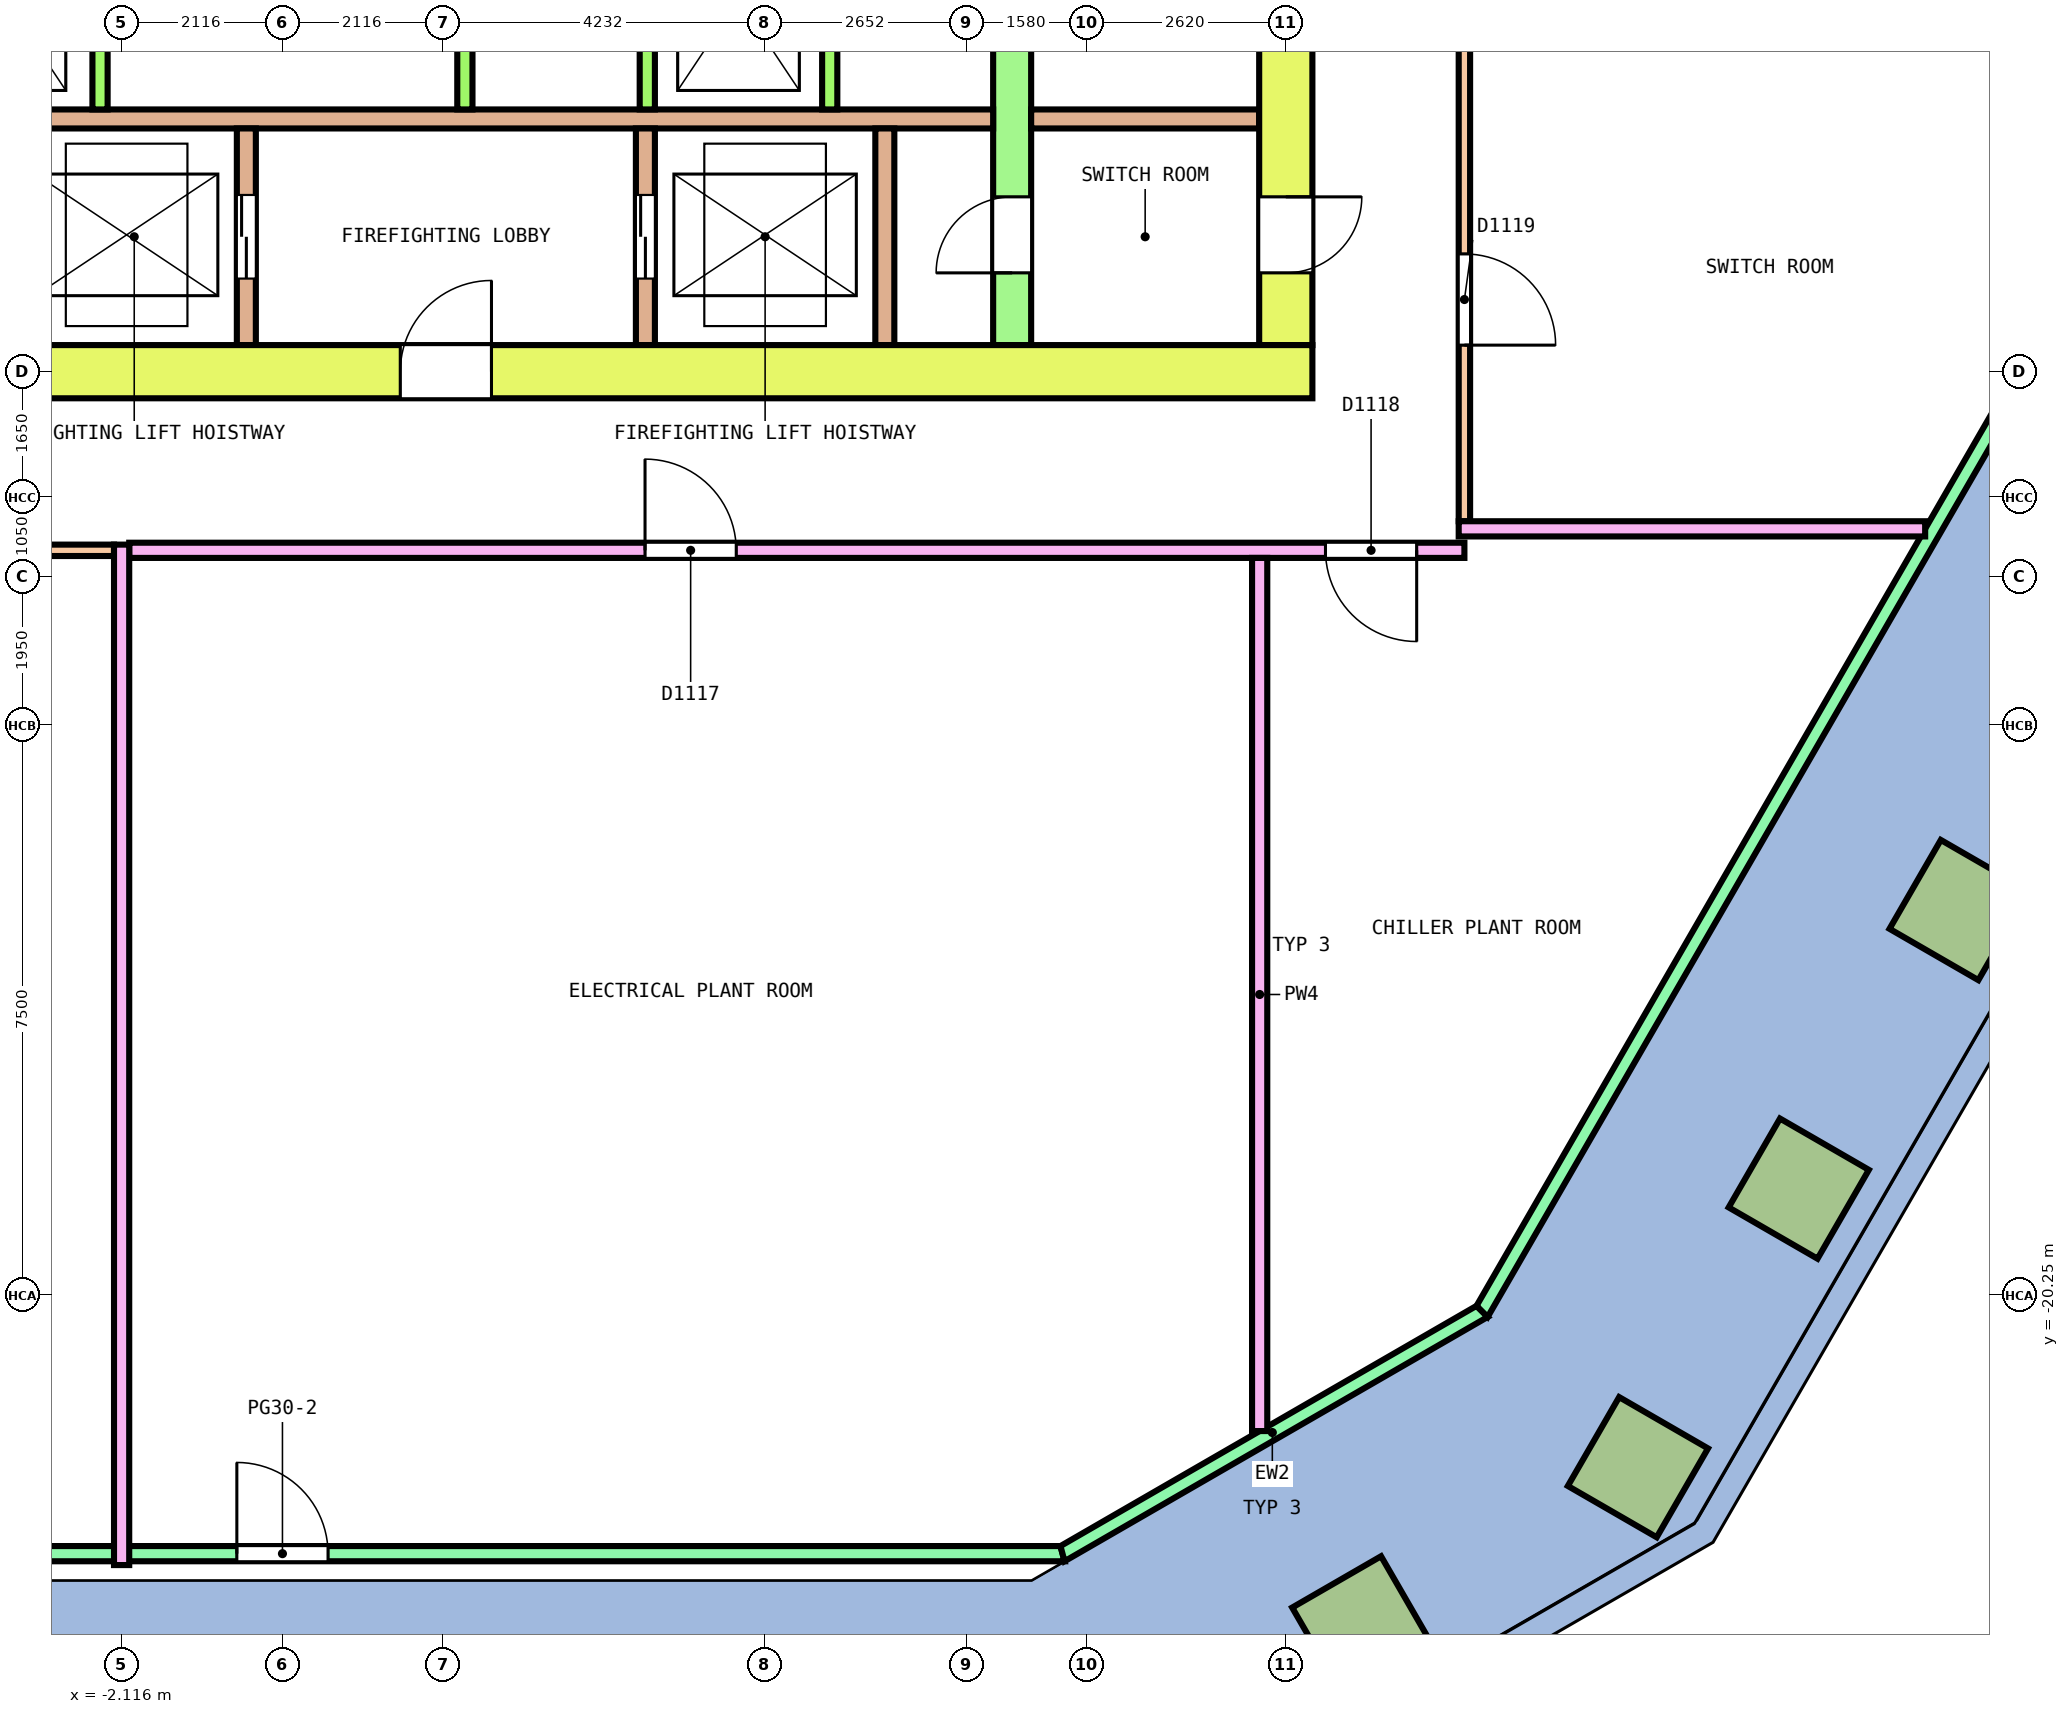
"""IFC4 building model, lengths in metres.
Left out: names, types, materials, properties, quantities, classifications, styles, units other than length and angle.
Written with IfcOpenShell. Run it as: python <this file> out.ifc"""

import sys

from ifc_helpers import new_model, si_unit, direction, frame, frame_2d, origin, origin_2d, place, context, subcontext, project, spatial, polyline, rectangle, outline, extrude, element, fill, save


model = new_model("IFC4")
c1 = context("Model", 3, precision=1e-05, world=origin(), true_north=direction((0.0, 1.0)))
c2 = subcontext(c1, "Body", "Model", "MODEL_VIEW")
j1 = project(units=[si_unit("LENGTHUNIT", "METRE"), si_unit("PLANEANGLEUNIT", "RADIAN")], contexts=[c1])
p1 = place(None, origin())
s1 = spatial("IfcSite", under=j1, at=p1, CompositionType="ELEMENT")
p2 = place(p1, origin())
s2 = spatial("IfcBuilding", under=s1, at=p2, CompositionType="ELEMENT")
p3 = place(p2, frame((0.0, 0.0, 139.6)))
s3 = spatial("IfcBuildingStorey", under=s2, at=p3, CompositionType="ELEMENT", Elevation=139.6)
for number, where, z_axis, x_axis in (
    (1, (14.206, -24.606, 0.0), (0.0, 0.0, 1.0), (0.866, 0.5, 0.0)),
    (2, (17.833, -22.512, 0.0), (0.0, 0.0, 1.0), (0.5, 0.866, 0.0)),
    (3, (19.949, -18.847, 0.0), (0.0, 0.0, 1.0), (0.5, 0.866, 0.0)),
    (4, (22.065, -15.183, 0.0), (0.0, 0.0, 1.0), (0.5, 0.866, 0.0)),
):
    element("IfcColumn", number, at=place(p3, frame(where, z_axis=z_axis, x_axis=x_axis)), inside=s3, PredefinedType="COLUMN", context=c2, shape_type="SweptSolid", body=[
        extrude(rectangle(XDim=1.35, YDim=1.35, at=origin_2d()), origin(), (0.0, 0.0, 1.0), 5.25),
    ])
p4 = place(p3, frame((-10.263, -23.65, 0.0), z_axis=(0.0, 0.0, 1.0), x_axis=(1.0, 0.0, 0.0)))
e5 = element("IfcWall", 5, at=p4, inside=s3, PredefinedType="SOLIDWALL", context=c2, shape_type="SweptSolid", body=[
    extrude(outline(polyline([(-0.027, -0.1), (20.552, -0.1), (20.499, 0.1), (0.027, 0.1), (-0.027, -0.1)])), origin(), (0.0, 0.0, 1.0), 4.55),
])
p5 = place(p4, frame((9.663, 0.0, 0.0)))
e6 = element("IfcOpeningElement", 6, at=p5, cuts=e5, PredefinedType="OPENING", context=c2, shape_type="SweptSolid", body=[
    extrude(rectangle(XDim=1.2, YDim=2.1, at=frame_2d((0.6, 1.05))), frame((0.0, 0.11, 0.0), z_axis=(0.0, -1.0, 0.0), x_axis=(1.0, 0.0, 0.0)), (0.0, 0.0, 1.0), 0.22),
])
p6 = place(p3, frame((10.263, -23.65, 0.0), z_axis=(0.0, 0.0, 1.0), x_axis=(0.866026138243, 0.499998727878, 0.0)))
e7 = element("IfcWall", 7, at=p6, inside=s3, PredefinedType="SOLIDWALL", context=c2, shape_type="SweptSolid", body=[
    extrude(outline(polyline([(-0.027, -0.1), (6.401, -0.1), (6.348, 0.1), (0.027, 0.1), (-0.027, -0.1)])), origin(), (0.0, 0.0, 1.0), 4.55),
])
p7 = place(p3, frame((15.783, -20.463, 0.0), z_axis=(0.0, 0.0, 1.0), x_axis=(0.499999083763, 0.866025932773, 0.0)))
e8 = element("IfcWall", 8, at=p7, inside=s3, PredefinedType="SOLIDWALL", context=c2, shape_type="SweptSolid", body=[
    extrude(outline(polyline([(-0.027, -0.1), (19.686, -0.1), (19.632, 0.1), (0.027, 0.1), (-0.027, -0.1)])), origin(), (0.0, 0.0, 1.0), 4.55),
])
p8 = place(p3, frame((-13.55, -8.1, 0.0), z_axis=(0.0, 0.0, 1.0), x_axis=(1.0, 0.0, 0.0)))
e9 = element("IfcWall", 9, at=p8, inside=s3, PredefinedType="SHEAR", context=c2, shape_type="SweptSolid", body=[
    extrude(rectangle(XDim=27.1, YDim=0.7, at=frame_2d((13.55, 0.0))), origin(), (0.0, 0.0, 1.0), 5.3),
])
p9 = place(p8, frame((15.1, 0.0, 0.0)))
e10 = element("IfcOpeningElement", 10, at=p9, cuts=e9, PredefinedType="OPENING", context=c2, shape_type="SweptSolid", body=[
    extrude(rectangle(XDim=1.2, YDim=2.1, at=frame_2d((0.6, 1.05))), frame((0.0, 0.36, 0.0), z_axis=(0.0, -1.0, 0.0), x_axis=(1.0, 0.0, 0.0)), (0.0, 0.0, 1.0), 0.72),
])
p10 = place(p3, frame((13.2, -7.75, 0.0), z_axis=(0.0, 0.0, 1.0), x_axis=(0.0, 1.0, 0.0)))
e11 = element("IfcWall", 11, at=p10, inside=s3, PredefinedType="SHEAR", context=c2, shape_type="SweptSolid", body=[
    extrude(rectangle(XDim=15.5, YDim=0.7, at=frame_2d((7.75, 0.0))), origin(), (0.0, 0.0, 1.0), 5.3),
])
p11 = place(p10, frame((6.55, 0.0, 0.0)))
e12 = element("IfcOpeningElement", 12, at=p11, cuts=e11, PredefinedType="OPENING", context=c2, shape_type="SweptSolid", body=[
    extrude(rectangle(XDim=2.4, YDim=2.1, at=frame_2d((1.2, 1.05))), frame((0.0, 0.36, 0.0), z_axis=(0.0, -1.0, 0.0), x_axis=(1.0, 0.0, 0.0)), (0.0, 0.0, 1.0), 0.72),
])
p12 = place(p10, frame((13.45, 0.0, 0.0)))
e13 = element("IfcOpeningElement", 13, at=p12, cuts=e11, PredefinedType="OPENING", context=c2, shape_type="SweptSolid", body=[
    extrude(rectangle(XDim=1.2, YDim=2.1, at=frame_2d((0.6, 1.05))), frame((0.0, 0.36, 0.0), z_axis=(0.0, -1.0, 0.0), x_axis=(1.0, 0.0, 0.0)), (0.0, 0.0, 1.0), 0.72),
])
p13 = place(p10, frame((0.95, 0.0, 0.0)))
e14 = element("IfcOpeningElement", 14, at=p13, cuts=e11, PredefinedType="OPENING", context=c2, shape_type="SweptSolid", body=[
    extrude(rectangle(XDim=1.0, YDim=2.1, at=frame_2d((0.5, 1.05))), frame((0.0, 0.36, 0.0), z_axis=(0.0, -1.0, 0.0), x_axis=(1.0, 0.0, 0.0)), (0.0, 0.0, 1.0), 0.72),
])
p14 = place(p3, frame((9.6, -7.75, 0.0), z_axis=(0.0, 0.0, 1.0), x_axis=(0.0, 1.0, 0.0)))
e15 = element("IfcWall", 15, at=p14, inside=s3, PredefinedType="SHEAR", context=c2, shape_type="SweptSolid", body=[
    extrude(rectangle(XDim=15.5, YDim=0.5, at=frame_2d((7.75, 0.0))), origin(), (0.0, 0.0, 1.0), 5.3),
])
p15 = place(p14, frame((6.55, 0.0, 0.0)))
e16 = element("IfcOpeningElement", 16, at=p15, cuts=e15, PredefinedType="OPENING", context=c2, shape_type="SweptSolid", body=[
    extrude(rectangle(XDim=2.4, YDim=2.1, at=frame_2d((1.2, 1.05))), frame((0.0, 0.26, 0.0), z_axis=(0.0, -1.0, 0.0), x_axis=(1.0, 0.0, 0.0)), (0.0, 0.0, 1.0), 0.52),
])
p16 = place(p14, frame((13.45, 0.0, 0.0)))
e17 = element("IfcOpeningElement", 17, at=p16, cuts=e15, PredefinedType="OPENING", context=c2, shape_type="SweptSolid", body=[
    extrude(rectangle(XDim=1.2, YDim=2.1, at=frame_2d((0.6, 1.05))), frame((0.0, 0.26, 0.0), z_axis=(0.0, -1.0, 0.0), x_axis=(1.0, 0.0, 0.0)), (0.0, 0.0, 1.0), 0.52),
])
p17 = place(p14, frame((0.95, 0.0, 0.0)))
e18 = element("IfcOpeningElement", 18, at=p17, cuts=e15, PredefinedType="OPENING", context=c2, shape_type="SweptSolid", body=[
    extrude(rectangle(XDim=1.0, YDim=2.1, at=frame_2d((0.5, 1.05))), frame((0.0, 0.26, 0.0), z_axis=(0.0, -1.0, 0.0), x_axis=(1.0, 0.0, 0.0)), (0.0, 0.0, 1.0), 0.52),
])
p18 = place(p3, frame((-9.35, -4.775, 0.0), z_axis=(0.0, 0.0, 1.0), x_axis=(1.0, 0.0, 0.0)))
e19 = element("IfcWall", 19, at=p18, inside=s3, PredefinedType="SOLIDWALL", context=c2, shape_type="SweptSolid", body=[
    extrude(rectangle(XDim=18.7, YDim=0.25, at=frame_2d((9.35, 0.0))), origin(), (0.0, 0.0, 1.0), 5.3),
])
p19 = place(p3, frame((9.85, -4.775, 0.0), z_axis=(0.0, 0.0, 1.0), x_axis=(1.0, 0.0, 0.0)))
e20 = element("IfcWall", 20, at=p19, inside=s3, PredefinedType="SOLIDWALL", context=c2, shape_type="SweptSolid", body=[
    extrude(rectangle(XDim=3.0, YDim=0.25, at=frame_2d((1.5, 0.0))), origin(), (0.0, 0.0, 1.0), 5.3),
])
for number, where, z_axis, x_axis in (
    (21, (-2.4, -4.65, 0.0), (0.0, 0.0, 1.0), (0.0, 1.0, 0.0)),
    (22, (2.4, -4.65, 0.0), (0.0, 0.0, 1.0), (0.0, 1.0, 0.0)),
    (23, (4.8, -4.65, 0.0), (0.0, 0.0, 1.0), (0.0, 1.0, 0.0)),
    (24, (7.2, -4.65, 0.0), (0.0, 0.0, 1.0), (0.0, 1.0, 0.0)),
):
    element("IfcWall", number, at=place(p3, frame(where, z_axis=z_axis, x_axis=x_axis)), inside=s3, PredefinedType="SOLIDWALL", context=c2, shape_type="SweptSolid", body=[
        extrude(rectangle(XDim=2.9, YDim=0.2, at=frame_2d((1.45, 0.0))), origin(), (0.0, 0.0, 1.0), 5.3),
    ])
p20 = place(p3, frame((-0.475, -7.75, 0.0), z_axis=(0.0, 0.0, 1.0), x_axis=(0.0, 1.0, 0.0)))
e25 = element("IfcWall", 25, at=p20, inside=s3, PredefinedType="SOLIDWALL", context=c2, shape_type="SweptSolid", body=[
    extrude(rectangle(XDim=2.85, YDim=0.25, at=frame_2d((1.425, 0.0))), origin(), (0.0, 0.0, 1.0), 5.3),
])
p21 = place(p20, frame((0.875, 0.0, 0.0)))
e26 = element("IfcOpeningElement", 26, at=p21, cuts=e25, PredefinedType="OPENING", context=c2, shape_type="SweptSolid", body=[
    extrude(rectangle(XDim=1.1, YDim=2.1, at=frame_2d((0.55, 1.05))), frame((0.0, 0.135, 0.0), z_axis=(0.0, -1.0, 0.0), x_axis=(1.0, 0.0, 0.0)), (0.0, 0.0, 1.0), 0.27),
])
p22 = place(p3, frame((4.775, -7.75, 0.0), z_axis=(0.0, 0.0, 1.0), x_axis=(0.0, 1.0, 0.0)))
e27 = element("IfcWall", 27, at=p22, inside=s3, PredefinedType="SOLIDWALL", context=c2, shape_type="SweptSolid", body=[
    extrude(rectangle(XDim=2.85, YDim=0.25, at=frame_2d((1.425, 0.0))), origin(), (0.0, 0.0, 1.0), 5.3),
])
p23 = place(p22, frame((0.875, 0.0, 0.0)))
e28 = element("IfcOpeningElement", 28, at=p23, cuts=e27, PredefinedType="OPENING", context=c2, shape_type="SweptSolid", body=[
    extrude(rectangle(XDim=1.1, YDim=2.1, at=frame_2d((0.55, 1.05))), frame((0.0, 0.135, 0.0), z_axis=(0.0, -1.0, 0.0), x_axis=(1.0, 0.0, 0.0)), (0.0, 0.0, 1.0), 0.27),
])
p24 = place(p3, frame((7.925, -7.75, 0.0), z_axis=(0.0, 0.0, 1.0), x_axis=(0.0, 1.0, 0.0)))
e29 = element("IfcWall", 29, at=p24, inside=s3, PredefinedType="SOLIDWALL", context=c2, shape_type="SweptSolid", body=[
    extrude(rectangle(XDim=2.85, YDim=0.25, at=frame_2d((1.425, 0.0))), origin(), (0.0, 0.0, 1.0), 5.3),
])
p25 = place(p3, frame((15.55, -10.067, 0.0), z_axis=(0.0, 0.0, 1.0), x_axis=(0.0, 1.0, 0.0)))
e30 = element("IfcWall", 30, at=p25, inside=s3, PredefinedType="PARTITIONING", context=c2, shape_type="SweptSolid", body=[
    extrude(rectangle(XDim=13.431, YDim=0.15, at=frame_2d((6.716, 0.0))), origin(), (0.0, 0.0, 1.0), 4.25),
])
p26 = place(p25, frame((11.3, 0.0, 0.0)))
e31 = element("IfcOpeningElement", 31, at=p26, cuts=e30, PredefinedType="OPENING", context=c2, shape_type="SweptSolid", body=[
    extrude(rectangle(XDim=1.0, YDim=2.1, at=frame_2d((0.5, 1.05))), frame((0.0, 0.085, 0.0), z_axis=(0.0, -1.0, 0.0), x_axis=(1.0, 0.0, 0.0)), (0.0, 0.0, 1.0), 0.17),
])
p27 = place(p25, frame((2.317, 0.0, 0.0)))
e32 = element("IfcOpeningElement", 32, at=p27, cuts=e30, PredefinedType="OPENING", context=c2, shape_type="SweptSolid", body=[
    extrude(rectangle(XDim=1.2, YDim=2.1, at=frame_2d((0.6, 1.05))), frame((0.0, 0.085, 0.0), z_axis=(0.0, -1.0, 0.0), x_axis=(1.0, 0.0, 0.0)), (0.0, 0.0, 1.0), 0.17),
])
p28 = place(p3, frame((-15.45, -10.45, 0.0), z_axis=(0.0, 0.0, 1.0), x_axis=(1.0, 0.0, 0.0)))
e33 = element("IfcWall", 33, at=p28, inside=s3, PredefinedType="PARTITIONING", context=c2, shape_type="SweptSolid", body=[
    extrude(rectangle(XDim=13.234, YDim=0.15, at=frame_2d((6.617, 0.0))), origin(), (0.0, 0.0, 1.0), 4.25),
])
p29 = place(p28, frame((0.528, 0.0, 0.0)))
e34 = element("IfcOpeningElement", 34, at=p29, cuts=e33, PredefinedType="OPENING", context=c2, shape_type="SweptSolid", body=[
    extrude(rectangle(XDim=1.2, YDim=2.1, at=frame_2d((0.6, 1.05))), frame((0.0, 0.085, 0.0), z_axis=(0.0, -1.0, 0.0), x_axis=(1.0, 0.0, 0.0)), (0.0, 0.0, 1.0), 0.17),
])
p30 = place(p28, frame((8.69, 0.0, 0.0)))
e35 = element("IfcOpeningElement", 35, at=p30, cuts=e33, PredefinedType="OPENING", context=c2, shape_type="SweptSolid", body=[
    extrude(rectangle(XDim=1.2, YDim=2.1, at=frame_2d((0.6, 1.05))), frame((0.0, 0.085, 0.0), z_axis=(0.0, -1.0, 0.0), x_axis=(1.0, 0.0, 0.0)), (0.0, 0.0, 1.0), 0.17),
])
p31 = place(p3, frame((-2.016, -10.45, 0.0), z_axis=(0.0, 0.0, 1.0), x_axis=(1.0, 0.0, 0.0)))
e36 = element("IfcWall", 36, at=p31, inside=s3, PredefinedType="PARTITIONING", context=c2, shape_type="SweptSolid", body=[
    extrude(rectangle(XDim=17.566, YDim=0.2, at=frame_2d((8.783, 0.0))), origin(), (0.0, 0.0, 1.0), 4.25),
])
p32 = place(p31, frame((6.786, 0.0, 0.0)))
e37 = element("IfcOpeningElement", 37, at=p32, cuts=e36, PredefinedType="OPENING", context=c2, shape_type="SweptSolid", body=[
    extrude(rectangle(XDim=1.2, YDim=2.1, at=frame_2d((0.6, 1.05))), frame((0.0, 0.11, 0.0), z_axis=(0.0, -1.0, 0.0), x_axis=(1.0, 0.0, 0.0)), (0.0, 0.0, 1.0), 0.22),
])
p33 = place(p31, frame((15.738, 0.0, 0.0)))
e38 = element("IfcOpeningElement", 38, at=p33, cuts=e36, PredefinedType="OPENING", context=c2, shape_type="SweptSolid", body=[
    extrude(rectangle(XDim=1.2, YDim=2.1, at=frame_2d((0.6, 1.05))), frame((0.0, 0.11, 0.0), z_axis=(0.0, -1.0, 0.0), x_axis=(1.0, 0.0, 0.0)), (0.0, 0.0, 1.0), 0.22),
])
p34 = place(p3, frame((-2.116, -23.8, 0.0), z_axis=(0.0, 0.0, 1.0), x_axis=(0.0, 1.0, 0.0)))
e39 = element("IfcWall", 39, at=p34, inside=s3, PredefinedType="PARTITIONING", context=c2, shape_type="SweptSolid", body=[
    extrude(rectangle(XDim=13.425, YDim=0.2, at=frame_2d((6.712, 0.0))), origin(), (0.0, 0.0, 1.0), 4.25),
])
p35 = place(p3, frame((12.856, -22.037, 0.0), z_axis=(0.0, 0.0, 1.0), x_axis=(0.0, 1.0, 0.0)))
e40 = element("IfcWall", 40, at=p35, inside=s3, PredefinedType="PARTITIONING", context=c2, shape_type="SweptSolid", body=[
    extrude(rectangle(XDim=11.487, YDim=0.2, at=frame_2d((5.744, 0.0))), origin(), (0.0, 0.0, 1.0), 4.25),
])
p36 = place(p3, frame((15.475, -10.167, 0.0), z_axis=(0.0, 0.0, 1.0), x_axis=(1.0, 0.0, 0.0)))
e41 = element("IfcWall", 41, at=p36, inside=s3, PredefinedType="PARTITIONING", context=c2, shape_type="SweptSolid", body=[
    extrude(rectangle(XDim=6.137, YDim=0.2, at=frame_2d((3.068, 0.0))), origin(), (0.0, 0.0, 1.0), 4.25),
])
p37 = place(p5, origin())
e42 = element("IfcDoor", 42, at=p37, inside=s3, OperationType="SINGLE_SWING_RIGHT", PredefinedType="DOOR", context=c2, shape_type="SweptSolid", body=[
    extrude(rectangle(XDim=1.2, YDim=2.1, at=frame_2d((0.6, 1.05))), frame((0.0, 0.025, 0.0), z_axis=(0.0, -1.0, 0.0), x_axis=(1.0, 0.0, 0.0)), (0.0, 0.0, 1.0), 0.05),
])
fill(e6, e42)
p38 = place(p21, origin())
e43 = element("IfcDoor", 43, at=p38, inside=s3, OperationType="DOUBLE_DOOR_SLIDING", PredefinedType="DOOR", context=c2, shape_type="SweptSolid", body=[
    extrude(rectangle(XDim=1.1, YDim=2.1, at=frame_2d((0.55, 1.05))), frame((0.0, 0.075, 0.0), z_axis=(0.0, -1.0, 0.0), x_axis=(1.0, 0.0, 0.0)), (0.0, 0.0, 1.0), 0.15),
])
fill(e26, e43)
p39 = place(p23, origin())
e44 = element("IfcDoor", 44, at=p39, inside=s3, OperationType="DOUBLE_DOOR_SLIDING", PredefinedType="DOOR", context=c2, shape_type="SweptSolid", body=[
    extrude(rectangle(XDim=1.1, YDim=2.1, at=frame_2d((0.55, 1.05))), frame((0.0, 0.075, 0.0), z_axis=(0.0, -1.0, 0.0), x_axis=(1.0, 0.0, 0.0)), (0.0, 0.0, 1.0), 0.15),
])
fill(e28, e44)
p40 = place(p9, origin())
e45 = element("IfcDoor", 45, at=p40, inside=s3, OperationType="SINGLE_SWING_RIGHT", PredefinedType="DOOR", context=c2, shape_type="SweptSolid", body=[
    extrude(rectangle(XDim=1.2, YDim=2.1, at=frame_2d((0.6, 1.05))), frame((0.0, 0.3, 0.0), z_axis=(0.0, -1.0, 0.0), x_axis=(1.0, 0.0, 0.0)), (0.0, 0.0, 1.0), 0.6),
])
fill(e10, e45)
p41 = place(p17, origin())
e46 = element("IfcDoor", 46, at=p41, inside=s3, OperationType="SINGLE_SWING_RIGHT", PredefinedType="DOOR", context=c2, shape_type="SweptSolid", body=[
    extrude(rectangle(XDim=1.0, YDim=2.1, at=frame_2d((0.5, 1.05))), frame((0.0, 0.2, 0.0), z_axis=(0.0, -1.0, 0.0), x_axis=(1.0, 0.0, 0.0)), (0.0, 0.0, 1.0), 0.4),
])
fill(e18, e46)
p42 = place(p13, origin())
e47 = element("IfcDoor", 47, at=p42, inside=s3, OperationType="SINGLE_SWING_LEFT", PredefinedType="DOOR", context=c2, shape_type="SweptSolid", body=[
    extrude(rectangle(XDim=1.0, YDim=2.1, at=frame_2d((0.5, 1.05))), frame((0.0, 0.3, 0.0), z_axis=(0.0, -1.0, 0.0), x_axis=(1.0, 0.0, 0.0)), (0.0, 0.0, 1.0), 0.6),
])
fill(e14, e47)
p43 = place(p32, origin())
e48 = element("IfcDoor", 48, at=p43, inside=s3, OperationType="DOUBLE_DOOR_SINGLE_SWING", PredefinedType="DOOR", context=c2, shape_type="SweptSolid", body=[
    extrude(rectangle(XDim=1.2, YDim=2.1, at=frame_2d((0.6, 1.05))), frame((0.0, 0.025, 0.0), z_axis=(0.0, -1.0, 0.0), x_axis=(1.0, 0.0, 0.0)), (0.0, 0.0, 1.0), 0.05),
])
fill(e37, e48)
p44 = place(p33, origin())
e49 = element("IfcDoor", 49, at=p44, inside=s3, OperationType="DOUBLE_DOOR_SINGLE_SWING", PredefinedType="DOOR", context=c2, shape_type="SweptSolid", body=[
    extrude(rectangle(XDim=1.2, YDim=2.1, at=frame_2d((0.6, 1.05))), frame((0.0, 0.025, 0.0), z_axis=(0.0, -1.0, 0.0), x_axis=(1.0, 0.0, 0.0)), (0.0, 0.0, 1.0), 0.05),
])
fill(e38, e49)
p45 = place(p27, origin())
e50 = element("IfcDoor", 50, at=p45, inside=s3, OperationType="DOUBLE_DOOR_SINGLE_SWING", PredefinedType="DOOR", context=c2, shape_type="SweptSolid", body=[
    extrude(rectangle(XDim=1.2, YDim=2.1, at=frame_2d((0.6, 1.05))), frame((0.0, 0.025, 0.0), z_axis=(0.0, -1.0, 0.0), x_axis=(1.0, 0.0, 0.0)), (0.0, 0.0, 1.0), 0.05),
])
fill(e32, e50)
save(model, sys.argv[1])
